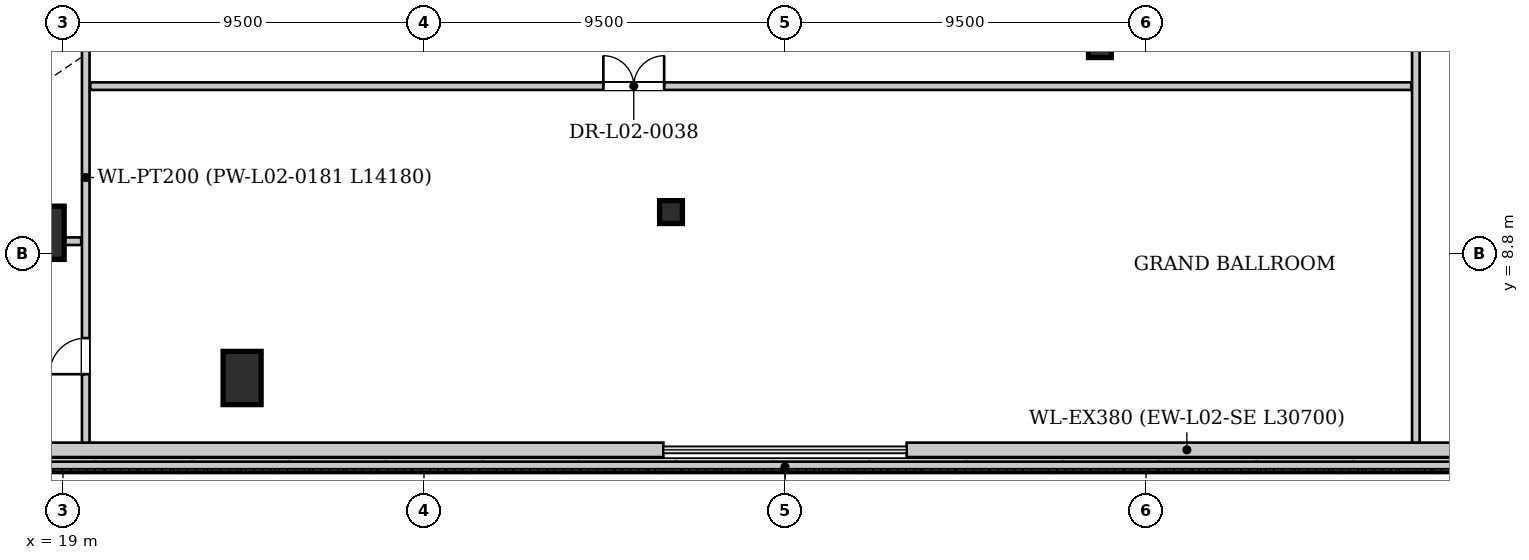
"""IFC4 building model, lengths in metres.
Left out: names, types, materials, properties, quantities, classifications, styles, units other than length and angle.
Written with IfcOpenShell. Run it as: python <this file> out.ifc"""

import sys

from ifc_helpers import new_model, si_unit, direction, frame, frame_2d, origin, origin_2d, place, context, subcontext, project, spatial, rectangle, hollow_rectangle, extrude, source, transform, mapped, element, fill, save


model = new_model("IFC4")
c1 = context("Model", 3, precision=1e-05, world=origin(), true_north=direction((0.0, 1.0)))
c2 = subcontext(c1, "Body", "Model", "MODEL_VIEW")
j1 = project(units=[si_unit("LENGTHUNIT", "METRE"), si_unit("PLANEANGLEUNIT", "RADIAN")], contexts=[c1])
p1 = place(None, origin())
s1 = spatial("IfcSite", under=j1, at=p1, CompositionType="ELEMENT")
p2 = place(p1, origin())
s2 = spatial("IfcBuilding", under=s1, at=p2, CompositionType="ELEMENT")
p3 = place(p2, frame((0.0, 0.0, 10.2)))
s3 = spatial("IfcBuildingStorey", under=s2, at=p3, CompositionType="ELEMENT", Elevation=10.2)
m1 = source(origin(), c2, "Body", "SweptSolid", [
    extrude(rectangle(XDim=1.0, YDim=1.4, at=origin_2d()), origin(), (0.0, 0.0, 1.0), 5.235),
])
for number, where, z_axis, x_axis in (
    (1, (18.532, 9.341, 0.0), (0.0, 0.0, 1.0), (1.0, 0.0, 0.0)),
    (2, (23.714, 5.52, 0.0), (0.0, 0.0, 1.0), (1.0, 0.0, 0.0)),
):
    element("IfcColumn", number, at=place(p3, frame(where, z_axis=z_axis, x_axis=x_axis)), inside=s3, PredefinedType="COLUMN", context=c2, shape_type="MappedRepresentation", body=[
        mapped(m1, transform((0.0, 0.0, 0.0), x_axis=(1.0, 0.0, 0.0), y_axis=(0.0, 1.0, 0.0), z_axis=(0.0, 0.0, 1.0), scale=1.0)),
    ])
m2 = source(origin(), c2, "Body", "SweptSolid", [
    extrude(hollow_rectangle(XDim=0.6, YDim=0.6, WallThickness=0.035, at=origin_2d()), origin(), (0.0, 0.0, 1.0), 5.235),
])
for number, where, z_axis, x_axis in (
    (3, (35.0, 9.886, 0.0), (0.0, 0.0, 1.0), (1.0, 0.0, 0.0)),
    (4, (46.286, 14.252, 0.0), (0.0, 0.0, 1.0), (1.0, 0.0, 0.0)),
):
    element("IfcColumn", number, at=place(p3, frame(where, z_axis=z_axis, x_axis=x_axis)), inside=s3, PredefinedType="COLUMN", context=c2, shape_type="MappedRepresentation", body=[
        mapped(m2, transform((0.0, 0.0, 0.0), x_axis=(1.0, 0.0, 0.0), y_axis=(0.0, 1.0, 0.0), z_axis=(0.0, 0.0, 1.0), scale=1.0)),
    ])
p4 = place(p3, frame((71.9, 3.63, 0.0), z_axis=(0.0, 0.0, 1.0), x_axis=(-1.0, 0.0, 0.0)))
e5 = element("IfcWall", 5, at=p4, inside=s3, PredefinedType="SOLIDWALL", context=c2, shape_type="SweptSolid", body=[
    extrude(rectangle(XDim=30.7, YDim=0.38, at=frame_2d((15.35, 0.0))), origin(), (0.0, 0.0, 1.0), 4.472),
])
p5 = place(p4, frame((13.4, 0.0, 0.85)))
e6 = element("IfcOpeningElement", 6, at=p5, cuts=e5, PredefinedType="OPENING", context=c2, shape_type="SweptSolid", body=[
    extrude(rectangle(XDim=2.4, YDim=3.0, at=frame_2d((1.2, 1.5))), frame((0.0, 0.2, 0.0), z_axis=(0.0, -1.0, 0.0), x_axis=(1.0, 0.0, 0.0)), (0.0, 0.0, 1.0), 0.4),
])
p6 = place(p3, frame((34.8, 3.63, 0.0), z_axis=(0.0, 0.0, 1.0), x_axis=(-1.0, 0.0, 0.0)))
e7 = element("IfcWall", 7, at=p6, inside=s3, PredefinedType="SOLIDWALL", context=c2, shape_type="SweptSolid", body=[
    extrude(rectangle(XDim=30.7, YDim=0.38, at=frame_2d((15.35, 0.0))), origin(), (0.0, 0.0, 1.0), 4.472),
])
p7 = place(p6, frame((17.15, 0.0, 0.85)))
e8 = element("IfcOpeningElement", 8, at=p7, cuts=e7, PredefinedType="OPENING", context=c2, shape_type="SweptSolid", body=[
    extrude(rectangle(XDim=2.4, YDim=3.0, at=frame_2d((1.2, 1.5))), frame((0.0, 0.2, 0.0), z_axis=(0.0, -1.0, 0.0), x_axis=(1.0, 0.0, 0.0)), (0.0, 0.0, 1.0), 0.4),
])
p8 = place(p3, frame((3.25, 3.18, 0.0), z_axis=(0.0, 0.0, 1.0), x_axis=(1.0, 0.0, 0.0)))
e9 = element("IfcWall", 9, at=p8, inside=s3, PredefinedType="PARAPET", context=c2, shape_type="SweptSolid", body=[
    extrude(rectangle(XDim=69.5, YDim=0.28, at=frame_2d((34.75, 0.0))), origin(), (0.0, 0.0, 1.0), 0.45),
])
p9 = place(p3, frame((19.6, 3.82, 0.0), z_axis=(0.0, 0.0, 1.0), x_axis=(0.0, 1.0, 0.0)))
e10 = element("IfcWall", 10, at=p9, inside=s3, PredefinedType="PARTITIONING", context=c2, shape_type="SweptSolid", body=[
    extrude(rectangle(XDim=14.18, YDim=0.2, at=frame_2d((7.09, 0.0))), origin(), (0.0, 0.0, 1.0), 4.43),
])
p10 = place(p9, frame((1.8, 0.0, 0.0)))
e11 = element("IfcOpeningElement", 11, at=p10, cuts=e10, PredefinedType="OPENING", context=c2, shape_type="SweptSolid", body=[
    extrude(rectangle(XDim=0.95, YDim=2.1, at=frame_2d((0.475, 1.05))), frame((0.0, 0.11, 0.0), z_axis=(0.0, -1.0, 0.0), x_axis=(1.0, 0.0, 0.0)), (0.0, 0.0, 1.0), 0.22),
])
p11 = place(p9, frame((11.2, 0.0, 0.0)))
e12 = element("IfcOpeningElement", 12, at=p11, cuts=e10, PredefinedType="OPENING", context=c2, shape_type="SweptSolid", body=[
    extrude(rectangle(XDim=1.6, YDim=2.2, at=frame_2d((0.8, 1.1))), frame((0.0, 0.11, 0.0), z_axis=(0.0, -1.0, 0.0), x_axis=(1.0, 0.0, 0.0)), (0.0, 0.0, 1.0), 0.22),
])
p12 = place(p3, frame((4.48, 9.12, 0.0), z_axis=(0.0, 0.0, 1.0), x_axis=(1.0, 0.0, 0.0)))
e13 = element("IfcWall", 13, at=p12, inside=s3, PredefinedType="PARTITIONING", context=c2, shape_type="SweptSolid", body=[
    extrude(rectangle(XDim=15.0, YDim=0.2, at=frame_2d((7.5, 0.0))), origin(), (0.0, 0.0, 1.0), 4.43),
])
p13 = place(p3, frame((19.72, 13.2, 0.0), z_axis=(0.0, 0.0, 1.0), x_axis=(1.0, 0.0, 0.0)))
e14 = element("IfcWall", 14, at=p13, inside=s3, PredefinedType="PARTITIONING", context=c2, shape_type="SweptSolid", body=[
    extrude(rectangle(XDim=34.76, YDim=0.2, at=frame_2d((17.38, 0.0))), origin(), (0.0, 0.0, 1.0), 4.43),
])
p14 = place(p13, frame((13.5, 0.0, 0.0)))
e15 = element("IfcOpeningElement", 15, at=p14, cuts=e14, PredefinedType="OPENING", context=c2, shape_type="SweptSolid", body=[
    extrude(rectangle(XDim=1.6, YDim=2.2, at=frame_2d((0.8, 1.1))), frame((0.0, 0.11, 0.0), z_axis=(0.0, -1.0, 0.0), x_axis=(1.0, 0.0, 0.0)), (0.0, 0.0, 1.0), 0.22),
])
p15 = place(p3, frame((54.6, 3.82, 0.0), z_axis=(0.0, 0.0, 1.0), x_axis=(0.0, 1.0, 0.0)))
e16 = element("IfcWall", 16, at=p15, inside=s3, PredefinedType="PARTITIONING", context=c2, shape_type="SweptSolid", body=[
    extrude(rectangle(XDim=38.98, YDim=0.2, at=frame_2d((19.49, 0.0))), origin(), (0.0, 0.0, 1.0), 4.43),
])
p16 = place(p15, frame((13.8, 0.0, 0.0)))
e17 = element("IfcOpeningElement", 17, at=p16, cuts=e16, PredefinedType="OPENING", context=c2, shape_type="SweptSolid", body=[
    extrude(rectangle(XDim=1.6, YDim=2.2, at=frame_2d((0.8, 1.1))), frame((0.0, 0.11, 0.0), z_axis=(0.0, -1.0, 0.0), x_axis=(1.0, 0.0, 0.0)), (0.0, 0.0, 1.0), 0.22),
])
p17 = place(p15, frame((24.0, 0.0, 0.0)))
e18 = element("IfcOpeningElement", 18, at=p17, cuts=e16, PredefinedType="OPENING", context=c2, shape_type="SweptSolid", body=[
    extrude(rectangle(XDim=1.6, YDim=2.2, at=frame_2d((0.8, 1.1))), frame((0.0, 0.11, 0.0), z_axis=(0.0, -1.0, 0.0), x_axis=(1.0, 0.0, 0.0)), (0.0, 0.0, 1.0), 0.22),
])
m3 = source(origin(), c2, "Body", "SweptSolid", [
    extrude(rectangle(XDim=0.95, YDim=2.1, at=frame_2d((0.475, 1.05))), frame((0.0, 0.025, 0.0), z_axis=(0.0, -1.0, 0.0), x_axis=(1.0, 0.0, 0.0)), (0.0, 0.0, 1.0), 0.05),
])
p18 = place(p10, origin())
e19 = element("IfcDoor", 19, at=p18, inside=s3, OperationType="SINGLE_SWING_LEFT", PredefinedType="DOOR", context=c2, shape_type="MappedRepresentation", body=[
    mapped(m3, transform((0.0, 0.0, 0.0), x_axis=(1.0, 0.0, 0.0), y_axis=(0.0, 1.0, 0.0), z_axis=(0.0, 0.0, 1.0), scale=1.0)),
])
fill(e11, e19)
m4 = source(origin(), c2, "Body", "SweptSolid", [
    extrude(rectangle(XDim=1.6, YDim=2.2, at=frame_2d((0.8, 1.1))), frame((0.0, 0.025, 0.0), z_axis=(0.0, -1.0, 0.0), x_axis=(1.0, 0.0, 0.0)), (0.0, 0.0, 1.0), 0.05),
])
p19 = place(p14, origin())
e20 = element("IfcDoor", 20, at=p19, inside=s3, OperationType="DOUBLE_DOOR_SINGLE_SWING", PredefinedType="DOOR", context=c2, shape_type="MappedRepresentation", body=[
    mapped(m4, transform((0.0, 0.0, 0.0), x_axis=(1.0, 0.0, 0.0), y_axis=(0.0, 1.0, 0.0), z_axis=(0.0, 0.0, 1.0), scale=1.0)),
])
fill(e15, e20)
save(model, sys.argv[1])
